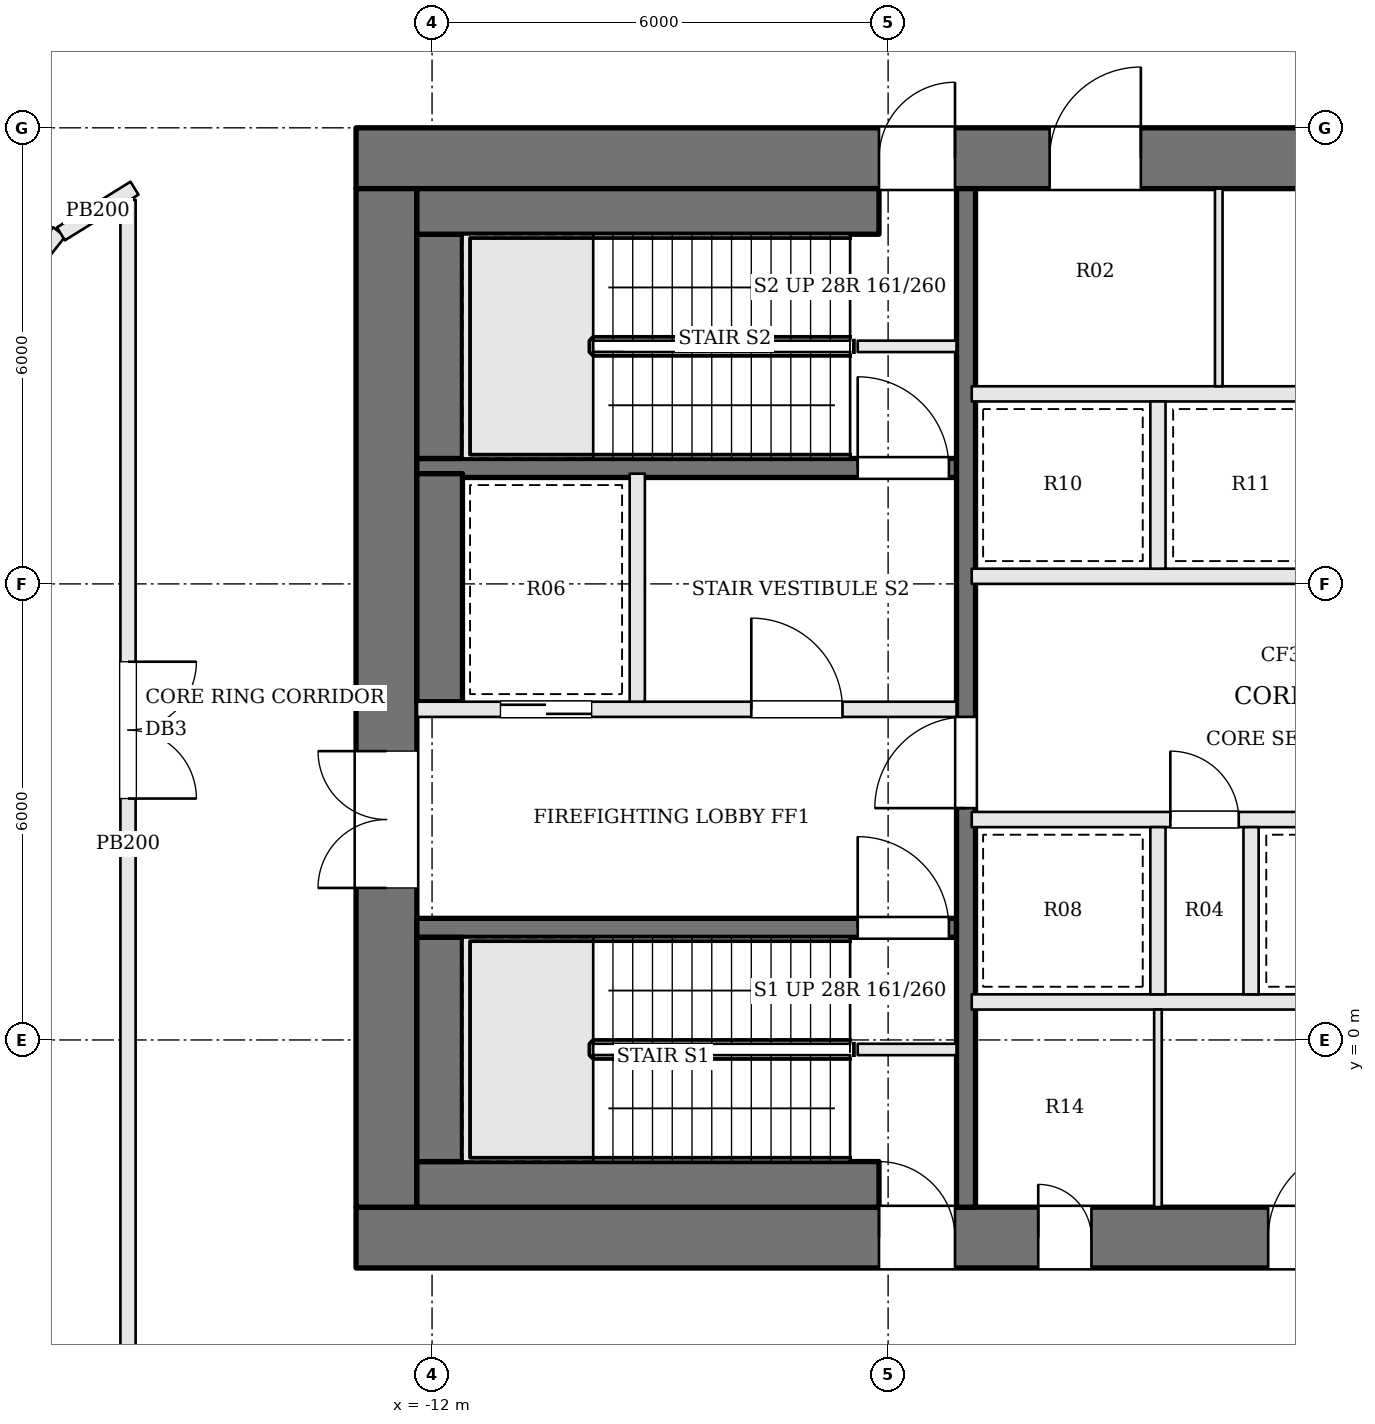
"""IFC4 building model, lengths in metres.
Left out: names, types, materials, properties, quantities, classifications, styles, units other than length and angle.
Written with IfcOpenShell. Run it as: python <this file> out.ifc"""

import sys

from ifc_helpers import new_model, si_unit, direction, frame, frame_2d, origin, place, context, subcontext, project, spatial, rectangle, extrude, element, fill, save


model = new_model("IFC4")
c1 = context("Model", 3, precision=1e-05, world=origin(), true_north=direction((0.0, 1.0)))
c2 = subcontext(c1, "Body", "Model", "MODEL_VIEW")
j1 = project(units=[si_unit("LENGTHUNIT", "METRE"), si_unit("PLANEANGLEUNIT", "RADIAN")], contexts=[c1])
p1 = place(None, origin())
s1 = spatial("IfcSite", under=j1, at=p1, CompositionType="ELEMENT")
p2 = place(p1, origin())
s2 = spatial("IfcBuilding", under=s1, at=p2, CompositionType="ELEMENT")
p3 = place(p2, frame((0.0, 0.0, 264.3)))
s3 = spatial("IfcBuildingStorey", under=s2, at=p3, CompositionType="ELEMENT", Elevation=264.3)
p4 = place(p3, frame((-13.0, 11.6, 0.0), z_axis=(0.0, 0.0, 1.0), x_axis=(1.0, 0.0, 0.0)))
e1 = element("IfcWall", 1, at=p4, inside=s3, PredefinedType="SHEAR", context=c2, shape_type="SweptSolid", body=[
    extrude(rectangle(XDim=26.0, YDim=0.8, at=frame_2d((13.0, 0.0))), origin(), (0.0, 0.0, 1.0), 4.5),
])
p5 = place(p4, frame((9.125, 0.0, 0.0)))
e2 = element("IfcOpeningElement", 2, at=p5, cuts=e1, PredefinedType="OPENING", context=c2, shape_type="SweptSolid", body=[
    extrude(rectangle(XDim=1.2, YDim=2.1, at=frame_2d((0.6, 1.05))), frame((0.0, 0.41, 0.0), z_axis=(0.0, -1.0, 0.0), x_axis=(1.0, 0.0, 0.0)), (0.0, 0.0, 1.0), 0.82),
])
p6 = place(p4, frame((12.375, 0.0, 0.0)))
e3 = element("IfcOpeningElement", 3, at=p6, cuts=e1, PredefinedType="OPENING", context=c2, shape_type="SweptSolid", body=[
    extrude(rectangle(XDim=1.2, YDim=2.1, at=frame_2d((0.6, 1.05))), frame((0.0, 0.41, 0.0), z_axis=(0.0, -1.0, 0.0), x_axis=(1.0, 0.0, 0.0)), (0.0, 0.0, 1.0), 0.82),
])
p7 = place(p4, frame((15.9, 0.0, 0.0)))
e4 = element("IfcOpeningElement", 4, at=p7, cuts=e1, PredefinedType="OPENING", context=c2, shape_type="SweptSolid", body=[
    extrude(rectangle(XDim=0.7, YDim=2.1, at=frame_2d((0.35, 1.05))), frame((0.0, 0.41, 0.0), z_axis=(0.0, -1.0, 0.0), x_axis=(1.0, 0.0, 0.0)), (0.0, 0.0, 1.0), 0.82),
])
p8 = place(p4, frame((6.88, 0.0, 0.0)))
e5 = element("IfcOpeningElement", 5, at=p8, cuts=e1, PredefinedType="OPENING", context=c2, shape_type="SweptSolid", body=[
    extrude(rectangle(XDim=1.0, YDim=2.1, at=frame_2d((0.5, 1.05))), frame((0.0, 0.41, 0.0), z_axis=(0.0, -1.0, 0.0), x_axis=(1.0, 0.0, 0.0)), (0.0, 0.0, 1.0), 0.82),
])
p9 = place(p4, frame((18.12, 0.0, 0.0)))
e6 = element("IfcOpeningElement", 6, at=p9, cuts=e1, PredefinedType="OPENING", context=c2, shape_type="SweptSolid", body=[
    extrude(rectangle(XDim=1.0, YDim=2.1, at=frame_2d((0.5, 1.05))), frame((0.0, 0.41, 0.0), z_axis=(0.0, -1.0, 0.0), x_axis=(1.0, 0.0, 0.0)), (0.0, 0.0, 1.0), 0.82),
])
p10 = place(p3, frame((-13.0, -2.6, 0.0), z_axis=(0.0, 0.0, 1.0), x_axis=(1.0, 0.0, 0.0)))
e7 = element("IfcWall", 7, at=p10, inside=s3, PredefinedType="SHEAR", context=c2, shape_type="SweptSolid", body=[
    extrude(rectangle(XDim=26.0, YDim=0.8, at=frame_2d((13.0, 0.0))), origin(), (0.0, 0.0, 1.0), 4.5),
])
p11 = place(p10, frame((8.975, 0.0, 0.0)))
e8 = element("IfcOpeningElement", 8, at=p11, cuts=e7, PredefinedType="OPENING", context=c2, shape_type="SweptSolid", body=[
    extrude(rectangle(XDim=0.7, YDim=2.1, at=frame_2d((0.35, 1.05))), frame((0.0, 0.41, 0.0), z_axis=(0.0, -1.0, 0.0), x_axis=(1.0, 0.0, 0.0)), (0.0, 0.0, 1.0), 0.82),
])
p12 = place(p10, frame((12.0, 0.0, 0.0)))
e9 = element("IfcOpeningElement", 9, at=p12, cuts=e7, PredefinedType="OPENING", context=c2, shape_type="SweptSolid", body=[
    extrude(rectangle(XDim=1.2, YDim=2.1, at=frame_2d((0.6, 1.05))), frame((0.0, 0.41, 0.0), z_axis=(0.0, -1.0, 0.0), x_axis=(1.0, 0.0, 0.0)), (0.0, 0.0, 1.0), 0.82),
])
p13 = place(p10, frame((15.675, 0.0, 0.0)))
e10 = element("IfcOpeningElement", 10, at=p13, cuts=e7, PredefinedType="OPENING", context=c2, shape_type="SweptSolid", body=[
    extrude(rectangle(XDim=1.2, YDim=2.1, at=frame_2d((0.6, 1.05))), frame((0.0, 0.41, 0.0), z_axis=(0.0, -1.0, 0.0), x_axis=(1.0, 0.0, 0.0)), (0.0, 0.0, 1.0), 0.82),
])
p14 = place(p10, frame((6.88, 0.0, 0.0)))
e11 = element("IfcOpeningElement", 11, at=p14, cuts=e7, PredefinedType="OPENING", context=c2, shape_type="SweptSolid", body=[
    extrude(rectangle(XDim=1.0, YDim=2.1, at=frame_2d((0.5, 1.05))), frame((0.0, 0.41, 0.0), z_axis=(0.0, -1.0, 0.0), x_axis=(1.0, 0.0, 0.0)), (0.0, 0.0, 1.0), 0.82),
])
p15 = place(p10, frame((18.12, 0.0, 0.0)))
e12 = element("IfcOpeningElement", 12, at=p15, cuts=e7, PredefinedType="OPENING", context=c2, shape_type="SweptSolid", body=[
    extrude(rectangle(XDim=1.0, YDim=2.1, at=frame_2d((0.5, 1.05))), frame((0.0, 0.41, 0.0), z_axis=(0.0, -1.0, 0.0), x_axis=(1.0, 0.0, 0.0)), (0.0, 0.0, 1.0), 0.82),
])
p16 = place(p3, frame((-12.6, -2.2, 0.0), z_axis=(0.0, 0.0, 1.0), x_axis=(0.0, 1.0, 0.0)))
e13 = element("IfcWall", 13, at=p16, inside=s3, PredefinedType="SHEAR", context=c2, shape_type="SweptSolid", body=[
    extrude(rectangle(XDim=13.4, YDim=0.8, at=frame_2d((6.7, 0.0))), origin(), (0.0, 0.0, 1.0), 4.5),
])
p17 = place(p16, frame((4.2, 0.0, 0.0)))
e14 = element("IfcOpeningElement", 14, at=p17, cuts=e13, PredefinedType="OPENING", context=c2, shape_type="SweptSolid", body=[
    extrude(rectangle(XDim=1.8, YDim=2.1, at=frame_2d((0.9, 1.05))), frame((0.0, 0.41, 0.0), z_axis=(0.0, -1.0, 0.0), x_axis=(1.0, 0.0, 0.0)), (0.0, 0.0, 1.0), 0.82),
])
for number, where, z_axis, x_axis in (
    (15, (-6.4, -0.125, 0.0), (0.0, 0.0, 1.0), (1.0, 0.0, 0.0)),
    (16, (-6.4, 9.125, 0.0), (0.0, 0.0, 1.0), (1.0, 0.0, 0.0)),
):
    element("IfcWall", number, at=place(p3, frame(where, z_axis=z_axis, x_axis=x_axis)), inside=s3, PredefinedType="SOLIDWALL", context=c2, shape_type="SweptSolid", body=[
        extrude(rectangle(XDim=1.3, YDim=0.15, at=frame_2d((0.65, 0.0))), origin(), (0.0, 0.0, 1.0), 4.3),
    ])
p18 = place(p3, frame((-12.2, 1.475, 0.0), z_axis=(0.0, 0.0, 1.0), x_axis=(1.0, 0.0, 0.0)))
e17 = element("IfcWall", 17, at=p18, inside=s3, PredefinedType="SOLIDWALL", context=c2, shape_type="SweptSolid", body=[
    extrude(rectangle(XDim=7.1, YDim=0.25, at=frame_2d((3.55, 0.0))), origin(), (0.0, 0.0, 1.0), 4.3),
])
p19 = place(p18, frame((5.8, 0.0, 0.0)))
e18 = element("IfcOpeningElement", 18, at=p19, cuts=e17, PredefinedType="OPENING", context=c2, shape_type="SweptSolid", body=[
    extrude(rectangle(XDim=1.2, YDim=2.1, at=frame_2d((0.6, 1.05))), frame((0.0, 0.135, 0.0), z_axis=(0.0, -1.0, 0.0), x_axis=(1.0, 0.0, 0.0)), (0.0, 0.0, 1.0), 0.27),
])
p20 = place(p3, frame((-12.2, 4.35, 0.0), z_axis=(0.0, 0.0, 1.0), x_axis=(1.0, 0.0, 0.0)))
e19 = element("IfcWall", 19, at=p20, inside=s3, PredefinedType="SOLIDWALL", context=c2, shape_type="SweptSolid", body=[
    extrude(rectangle(XDim=7.1, YDim=0.2, at=frame_2d((3.55, 0.0))), origin(), (0.0, 0.0, 1.0), 4.3),
])
p21 = place(p20, frame((4.4, 0.0, 0.0)))
e20 = element("IfcOpeningElement", 20, at=p21, cuts=e19, PredefinedType="OPENING", context=c2, shape_type="SweptSolid", body=[
    extrude(rectangle(XDim=1.2, YDim=2.1, at=frame_2d((0.6, 1.05))), frame((0.0, 0.11, 0.0), z_axis=(0.0, -1.0, 0.0), x_axis=(1.0, 0.0, 0.0)), (0.0, 0.0, 1.0), 0.22),
])
p22 = place(p20, frame((1.1, 0.0, 0.0)))
e21 = element("IfcOpeningElement", 21, at=p22, cuts=e19, PredefinedType="OPENING", context=c2, shape_type="SweptSolid", body=[
    extrude(rectangle(XDim=1.2, YDim=2.1, at=frame_2d((0.6, 1.05))), frame((0.0, 0.11, 0.0), z_axis=(0.0, -1.0, 0.0), x_axis=(1.0, 0.0, 0.0)), (0.0, 0.0, 1.0), 0.22),
])
p23 = place(p3, frame((-12.2, 7.525, 0.0), z_axis=(0.0, 0.0, 1.0), x_axis=(1.0, 0.0, 0.0)))
e22 = element("IfcWall", 22, at=p23, inside=s3, PredefinedType="SOLIDWALL", context=c2, shape_type="SweptSolid", body=[
    extrude(rectangle(XDim=7.1, YDim=0.25, at=frame_2d((3.55, 0.0))), origin(), (0.0, 0.0, 1.0), 4.3),
])
p24 = place(p23, frame((5.8, 0.0, 0.0)))
e23 = element("IfcOpeningElement", 23, at=p24, cuts=e22, PredefinedType="OPENING", context=c2, shape_type="SweptSolid", body=[
    extrude(rectangle(XDim=1.2, YDim=2.1, at=frame_2d((0.6, 1.05))), frame((0.0, 0.135, 0.0), z_axis=(0.0, -1.0, 0.0), x_axis=(1.0, 0.0, 0.0)), (0.0, 0.0, 1.0), 0.27),
])
p25 = place(p3, frame((-9.3, 4.45, 0.0), z_axis=(0.0, 0.0, 1.0), x_axis=(0.0, 1.0, 0.0)))
e24 = element("IfcWall", 24, at=p25, inside=s3, PredefinedType="SOLIDWALL", context=c2, shape_type="SweptSolid", body=[
    extrude(rectangle(XDim=3.0, YDim=0.2, at=frame_2d((1.5, 0.0))), origin(), (0.0, 0.0, 1.0), 4.3),
])
p26 = place(p3, frame((-4.975, -2.2, 0.0), z_axis=(0.0, 0.0, 1.0), x_axis=(0.0, 1.0, 0.0)))
e25 = element("IfcWall", 25, at=p26, inside=s3, PredefinedType="SOLIDWALL", context=c2, shape_type="SweptSolid", body=[
    extrude(rectangle(XDim=13.4, YDim=0.25, at=frame_2d((6.7, 0.0))), origin(), (0.0, 0.0, 1.0), 4.3),
])
p27 = place(p26, frame((5.25, 0.0, 0.0)))
e26 = element("IfcOpeningElement", 26, at=p27, cuts=e25, PredefinedType="OPENING", context=c2, shape_type="SweptSolid", body=[
    extrude(rectangle(XDim=1.2, YDim=2.1, at=frame_2d((0.6, 1.05))), frame((0.0, 0.135, 0.0), z_axis=(0.0, -1.0, 0.0), x_axis=(1.0, 0.0, 0.0)), (0.0, 0.0, 1.0), 0.27),
])
p28 = place(p3, frame((-12.2, -1.9, 0.0), z_axis=(0.0, 0.0, 1.0), x_axis=(1.0, 0.0, 0.0)))
e27 = element("IfcWall", 27, at=p28, inside=s3, PredefinedType="SOLIDWALL", context=c2, shape_type="SweptSolid", body=[
    extrude(rectangle(XDim=6.08, YDim=0.6, at=frame_2d((3.04, 0.0))), origin(), (0.0, 0.0, 1.0), 4.3),
])
p29 = place(p3, frame((-11.9, -1.6, 0.0), z_axis=(0.0, 0.0, 1.0), x_axis=(0.0, 1.0, 0.0)))
e28 = element("IfcWall", 28, at=p29, inside=s3, PredefinedType="SOLIDWALL", context=c2, shape_type="SweptSolid", body=[
    extrude(rectangle(XDim=2.95, YDim=0.6, at=frame_2d((1.475, 0.0))), origin(), (0.0, 0.0, 1.0), 4.3),
])
p30 = place(p3, frame((-11.9, 4.45, 0.0), z_axis=(0.0, 0.0, 1.0), x_axis=(0.0, 1.0, 0.0)))
e29 = element("IfcWall", 29, at=p30, inside=s3, PredefinedType="SOLIDWALL", context=c2, shape_type="SweptSolid", body=[
    extrude(rectangle(XDim=3.0, YDim=0.6, at=frame_2d((1.5, 0.0))), origin(), (0.0, 0.0, 1.0), 4.3),
])
p31 = place(p3, frame((-11.9, 7.65, 0.0), z_axis=(0.0, 0.0, 1.0), x_axis=(0.0, 1.0, 0.0)))
e30 = element("IfcWall", 30, at=p31, inside=s3, PredefinedType="SOLIDWALL", context=c2, shape_type="SweptSolid", body=[
    extrude(rectangle(XDim=2.95, YDim=0.6, at=frame_2d((1.475, 0.0))), origin(), (0.0, 0.0, 1.0), 4.3),
])
p32 = place(p3, frame((-12.2, 10.9, 0.0), z_axis=(0.0, 0.0, 1.0), x_axis=(1.0, 0.0, 0.0)))
e31 = element("IfcWall", 31, at=p32, inside=s3, PredefinedType="SOLIDWALL", context=c2, shape_type="SweptSolid", body=[
    extrude(rectangle(XDim=6.08, YDim=0.6, at=frame_2d((3.04, 0.0))), origin(), (0.0, 0.0, 1.0), 4.3),
])
p33 = place(p3, frame((-4.9, 0.5, 0.0), z_axis=(0.0, 0.0, 1.0), x_axis=(1.0, 0.0, 0.0)))
e32 = element("IfcWall", 32, at=p33, inside=s3, PredefinedType="SOLIDWALL", context=c2, shape_type="SweptSolid", body=[
    extrude(rectangle(XDim=9.8, YDim=0.2, at=frame_2d((4.9, 0.0))), origin(), (0.0, 0.0, 1.0), 4.3),
])
p34 = place(p3, frame((-4.9, 2.9, 0.0), z_axis=(0.0, 0.0, 1.0), x_axis=(1.0, 0.0, 0.0)))
e33 = element("IfcWall", 33, at=p34, inside=s3, PredefinedType="SOLIDWALL", context=c2, shape_type="SweptSolid", body=[
    extrude(rectangle(XDim=9.8, YDim=0.2, at=frame_2d((4.9, 0.0))), origin(), (0.0, 0.0, 1.0), 4.3),
])
p35 = place(p34, frame((2.613, 0.0, 0.0)))
e34 = element("IfcOpeningElement", 34, at=p35, cuts=e33, PredefinedType="OPENING", context=c2, shape_type="SweptSolid", body=[
    extrude(rectangle(XDim=0.9, YDim=2.1, at=frame_2d((0.45, 1.05))), frame((0.0, 0.11, 0.0), z_axis=(0.0, -1.0, 0.0), x_axis=(1.0, 0.0, 0.0)), (0.0, 0.0, 1.0), 0.22),
])
p36 = place(p34, frame((7.463, 0.0, 0.0)))
e35 = element("IfcOpeningElement", 35, at=p36, cuts=e33, PredefinedType="OPENING", context=c2, shape_type="SweptSolid", body=[
    extrude(rectangle(XDim=1.0, YDim=2.1, at=frame_2d((0.5, 1.05))), frame((0.0, 0.11, 0.0), z_axis=(0.0, -1.0, 0.0), x_axis=(1.0, 0.0, 0.0)), (0.0, 0.0, 1.0), 0.22),
])
for number, where, z_axis, x_axis in (
    (36, (-4.9, 6.1, 0.0), (0.0, 0.0, 1.0), (1.0, 0.0, 0.0)),
    (37, (-4.9, 8.5, 0.0), (0.0, 0.0, 1.0), (1.0, 0.0, 0.0)),
):
    element("IfcWall", number, at=place(p3, frame(where, z_axis=z_axis, x_axis=x_axis)), inside=s3, PredefinedType="SOLIDWALL", context=c2, shape_type="SweptSolid", body=[
        extrude(rectangle(XDim=9.8, YDim=0.2, at=frame_2d((4.9, 0.0))), origin(), (0.0, 0.0, 1.0), 4.3),
    ])
for number, where, z_axis, x_axis in (
    (38, (-2.45, 0.6, 0.0), (0.0, 0.0, 1.0), (0.0, 1.0, 0.0)),
    (39, (-1.225, 0.6, 0.0), (0.0, 0.0, 1.0), (0.0, 1.0, 0.0)),
    (40, (-2.45, 6.2, 0.0), (0.0, 0.0, 1.0), (0.0, 1.0, 0.0)),
):
    element("IfcWall", number, at=place(p3, frame(where, z_axis=z_axis, x_axis=x_axis)), inside=s3, PredefinedType="SOLIDWALL", context=c2, shape_type="SweptSolid", body=[
        extrude(rectangle(XDim=2.2, YDim=0.2, at=frame_2d((1.1, 0.0))), origin(), (0.0, 0.0, 1.0), 4.3),
    ])
for number, where, z_axis, x_axis in (
    (41, (-2.45, -2.2, 0.0), (0.0, 0.0, 1.0), (0.0, 1.0, 0.0)),
    (42, (-1.65, 8.6, 0.0), (0.0, 0.0, 1.0), (0.0, 1.0, 0.0)),
):
    element("IfcWall", number, at=place(p3, frame(where, z_axis=z_axis, x_axis=x_axis)), inside=s3, PredefinedType="PARTITIONING", context=c2, shape_type="SweptSolid", body=[
        extrude(rectangle(XDim=2.6, YDim=0.1, at=frame_2d((1.3, 0.0))), origin(), (0.0, 0.0, 1.0), 4.3),
    ])
p37 = place(p3, frame((-19.849, 6.895, 0.0), z_axis=(0.0, 0.0, 1.0), x_axis=(0.618811760178, 0.785539308669, 0.0)))
e43 = element("IfcWall", 43, at=p37, inside=s3, PredefinedType="PARTITIONING", context=c2, shape_type="SweptSolid", body=[
    extrude(rectangle(XDim=4.756, YDim=0.2, at=frame_2d((2.378, 0.0))), origin(), (0.0, 0.0, 1.0), 4.3),
])
p38 = place(p3, frame((-16.883, 10.605, 0.0), z_axis=(0.0, 0.0, 1.0), x_axis=(0.84954745962, 0.527512193085, 0.0)))
e44 = element("IfcWall", 44, at=p38, inside=s3, PredefinedType="PARTITIONING", context=c2, shape_type="SweptSolid", body=[
    extrude(rectangle(XDim=1.139, YDim=0.2, at=frame_2d((0.57, 0.0))), origin(), (0.0, 0.0, 1.0), 4.3),
])
p39 = place(p3, frame((-16.0, 11.053, 0.0), z_axis=(0.0, 0.0, 1.0), x_axis=(0.0, -1.0, 0.0)))
e45 = element("IfcWall", 45, at=p39, inside=s3, PredefinedType="PARTITIONING", context=c2, shape_type="SweptSolid", body=[
    extrude(rectangle(XDim=16.953, YDim=0.2, at=frame_2d((8.477, 0.0))), origin(), (0.0, 0.0, 1.0), 4.3),
])
p40 = place(p39, frame((6.077, 0.0, 0.0)))
e46 = element("IfcOpeningElement", 46, at=p40, cuts=e45, PredefinedType="OPENING", context=c2, shape_type="SweptSolid", body=[
    extrude(rectangle(XDim=1.8, YDim=2.1, at=frame_2d((0.9, 1.05))), frame((0.0, 0.11, 0.0), z_axis=(0.0, -1.0, 0.0), x_axis=(1.0, 0.0, 0.0)), (0.0, 0.0, 1.0), 0.22),
])
p41 = place(p17, origin())
e47 = element("IfcDoor", 47, at=p41, inside=s3, OperationType="DOUBLE_DOOR_SINGLE_SWING", PredefinedType="DOOR", context=c2, shape_type="SweptSolid", body=[
    extrude(rectangle(XDim=1.8, YDim=2.1, at=frame_2d((0.9, 1.05))), frame((0.0, 0.025, 0.0), z_axis=(0.0, -1.0, 0.0), x_axis=(1.0, 0.0, 0.0)), (0.0, 0.0, 1.0), 0.05),
])
fill(e14, e47)
p42 = place(p27, origin())
e48 = element("IfcDoor", 48, at=p42, inside=s3, OperationType="SINGLE_SWING_LEFT", PredefinedType="DOOR", context=c2, shape_type="SweptSolid", body=[
    extrude(rectangle(XDim=1.2, YDim=2.1, at=frame_2d((0.6, 1.05))), frame((0.0, 0.025, 0.0), z_axis=(0.0, -1.0, 0.0), x_axis=(1.0, 0.0, 0.0)), (0.0, 0.0, 1.0), 0.05),
])
fill(e26, e48)
p43 = place(p21, origin())
e49 = element("IfcDoor", 49, at=p43, inside=s3, OperationType="SINGLE_SWING_LEFT", PredefinedType="DOOR", context=c2, shape_type="SweptSolid", body=[
    extrude(rectangle(XDim=1.2, YDim=2.1, at=frame_2d((0.6, 1.05))), frame((0.0, 0.025, 0.0), z_axis=(0.0, -1.0, 0.0), x_axis=(1.0, 0.0, 0.0)), (0.0, 0.0, 1.0), 0.05),
])
fill(e20, e49)
p44 = place(p19, origin())
e50 = element("IfcDoor", 50, at=p44, inside=s3, OperationType="SINGLE_SWING_LEFT", PredefinedType="DOOR", context=c2, shape_type="SweptSolid", body=[
    extrude(rectangle(XDim=1.2, YDim=2.1, at=frame_2d((0.6, 1.05))), frame((0.0, 0.025, 0.0), z_axis=(0.0, -1.0, 0.0), x_axis=(1.0, 0.0, 0.0)), (0.0, 0.0, 1.0), 0.05),
])
fill(e18, e50)
p45 = place(p24, origin())
e51 = element("IfcDoor", 51, at=p45, inside=s3, OperationType="SINGLE_SWING_LEFT", PredefinedType="DOOR", context=c2, shape_type="SweptSolid", body=[
    extrude(rectangle(XDim=1.2, YDim=2.1, at=frame_2d((0.6, 1.05))), frame((0.0, 0.025, 0.0), z_axis=(0.0, -1.0, 0.0), x_axis=(1.0, 0.0, 0.0)), (0.0, 0.0, 1.0), 0.05),
])
fill(e23, e51)
p46 = place(p22, origin())
e52 = element("IfcDoor", 52, at=p46, inside=s3, OperationType="SLIDING_TO_RIGHT", PredefinedType="DOOR", context=c2, shape_type="SweptSolid", body=[
    extrude(rectangle(XDim=1.2, YDim=2.1, at=frame_2d((0.6, 1.05))), frame((0.0, 0.025, 0.0), z_axis=(0.0, -1.0, 0.0), x_axis=(1.0, 0.0, 0.0)), (0.0, 0.0, 1.0), 0.05),
])
fill(e21, e52)
p47 = place(p35, origin())
e53 = element("IfcDoor", 53, at=p47, inside=s3, OperationType="SINGLE_SWING_LEFT", PredefinedType="DOOR", context=c2, shape_type="SweptSolid", body=[
    extrude(rectangle(XDim=0.9, YDim=2.1, at=frame_2d((0.45, 1.05))), frame((0.0, 0.025, 0.0), z_axis=(0.0, -1.0, 0.0), x_axis=(1.0, 0.0, 0.0)), (0.0, 0.0, 1.0), 0.05),
])
fill(e34, e53)
p48 = place(p11, origin())
e54 = element("IfcDoor", 54, at=p48, inside=s3, OperationType="SINGLE_SWING_LEFT", PredefinedType="DOOR", context=c2, shape_type="SweptSolid", body=[
    extrude(rectangle(XDim=0.7, YDim=2.1, at=frame_2d((0.35, 1.05))), frame((0.0, 0.025, 0.0), z_axis=(0.0, -1.0, 0.0), x_axis=(1.0, 0.0, 0.0)), (0.0, 0.0, 1.0), 0.05),
])
fill(e8, e54)
p49 = place(p12, origin())
e55 = element("IfcDoor", 55, at=p49, inside=s3, OperationType="SINGLE_SWING_RIGHT", PredefinedType="DOOR", context=c2, shape_type="SweptSolid", body=[
    extrude(rectangle(XDim=1.2, YDim=2.1, at=frame_2d((0.6, 1.05))), frame((0.0, 0.025, 0.0), z_axis=(0.0, -1.0, 0.0), x_axis=(1.0, 0.0, 0.0)), (0.0, 0.0, 1.0), 0.05),
])
fill(e9, e55)
p50 = place(p5, origin())
e56 = element("IfcDoor", 56, at=p50, inside=s3, OperationType="SINGLE_SWING_RIGHT", PredefinedType="DOOR", context=c2, shape_type="SweptSolid", body=[
    extrude(rectangle(XDim=1.2, YDim=2.1, at=frame_2d((0.6, 1.05))), frame((0.0, 0.025, 0.0), z_axis=(0.0, -1.0, 0.0), x_axis=(1.0, 0.0, 0.0)), (0.0, 0.0, 1.0), 0.05),
])
fill(e2, e56)
p51 = place(p14, origin())
e57 = element("IfcDoor", 57, at=p51, inside=s3, OperationType="SINGLE_SWING_LEFT", PredefinedType="DOOR", context=c2, shape_type="SweptSolid", body=[
    extrude(rectangle(XDim=1.0, YDim=2.1, at=frame_2d((0.5, 1.05))), frame((0.0, 0.025, 0.0), z_axis=(0.0, -1.0, 0.0), x_axis=(1.0, 0.0, 0.0)), (0.0, 0.0, 1.0), 0.05),
])
fill(e11, e57)
p52 = place(p8, origin())
e58 = element("IfcDoor", 58, at=p52, inside=s3, OperationType="SINGLE_SWING_RIGHT", PredefinedType="DOOR", context=c2, shape_type="SweptSolid", body=[
    extrude(rectangle(XDim=1.0, YDim=2.1, at=frame_2d((0.5, 1.05))), frame((0.0, 0.025, 0.0), z_axis=(0.0, -1.0, 0.0), x_axis=(1.0, 0.0, 0.0)), (0.0, 0.0, 1.0), 0.05),
])
fill(e5, e58)
p53 = place(p40, origin())
e59 = element("IfcDoor", 59, at=p53, inside=s3, OperationType="DOUBLE_DOOR_SINGLE_SWING", PredefinedType="DOOR", context=c2, shape_type="SweptSolid", body=[
    extrude(rectangle(XDim=1.8, YDim=2.1, at=frame_2d((0.9, 1.05))), frame((0.0, 0.025, 0.0), z_axis=(0.0, -1.0, 0.0), x_axis=(1.0, 0.0, 0.0)), (0.0, 0.0, 1.0), 0.05),
])
fill(e46, e59)
save(model, sys.argv[1])
